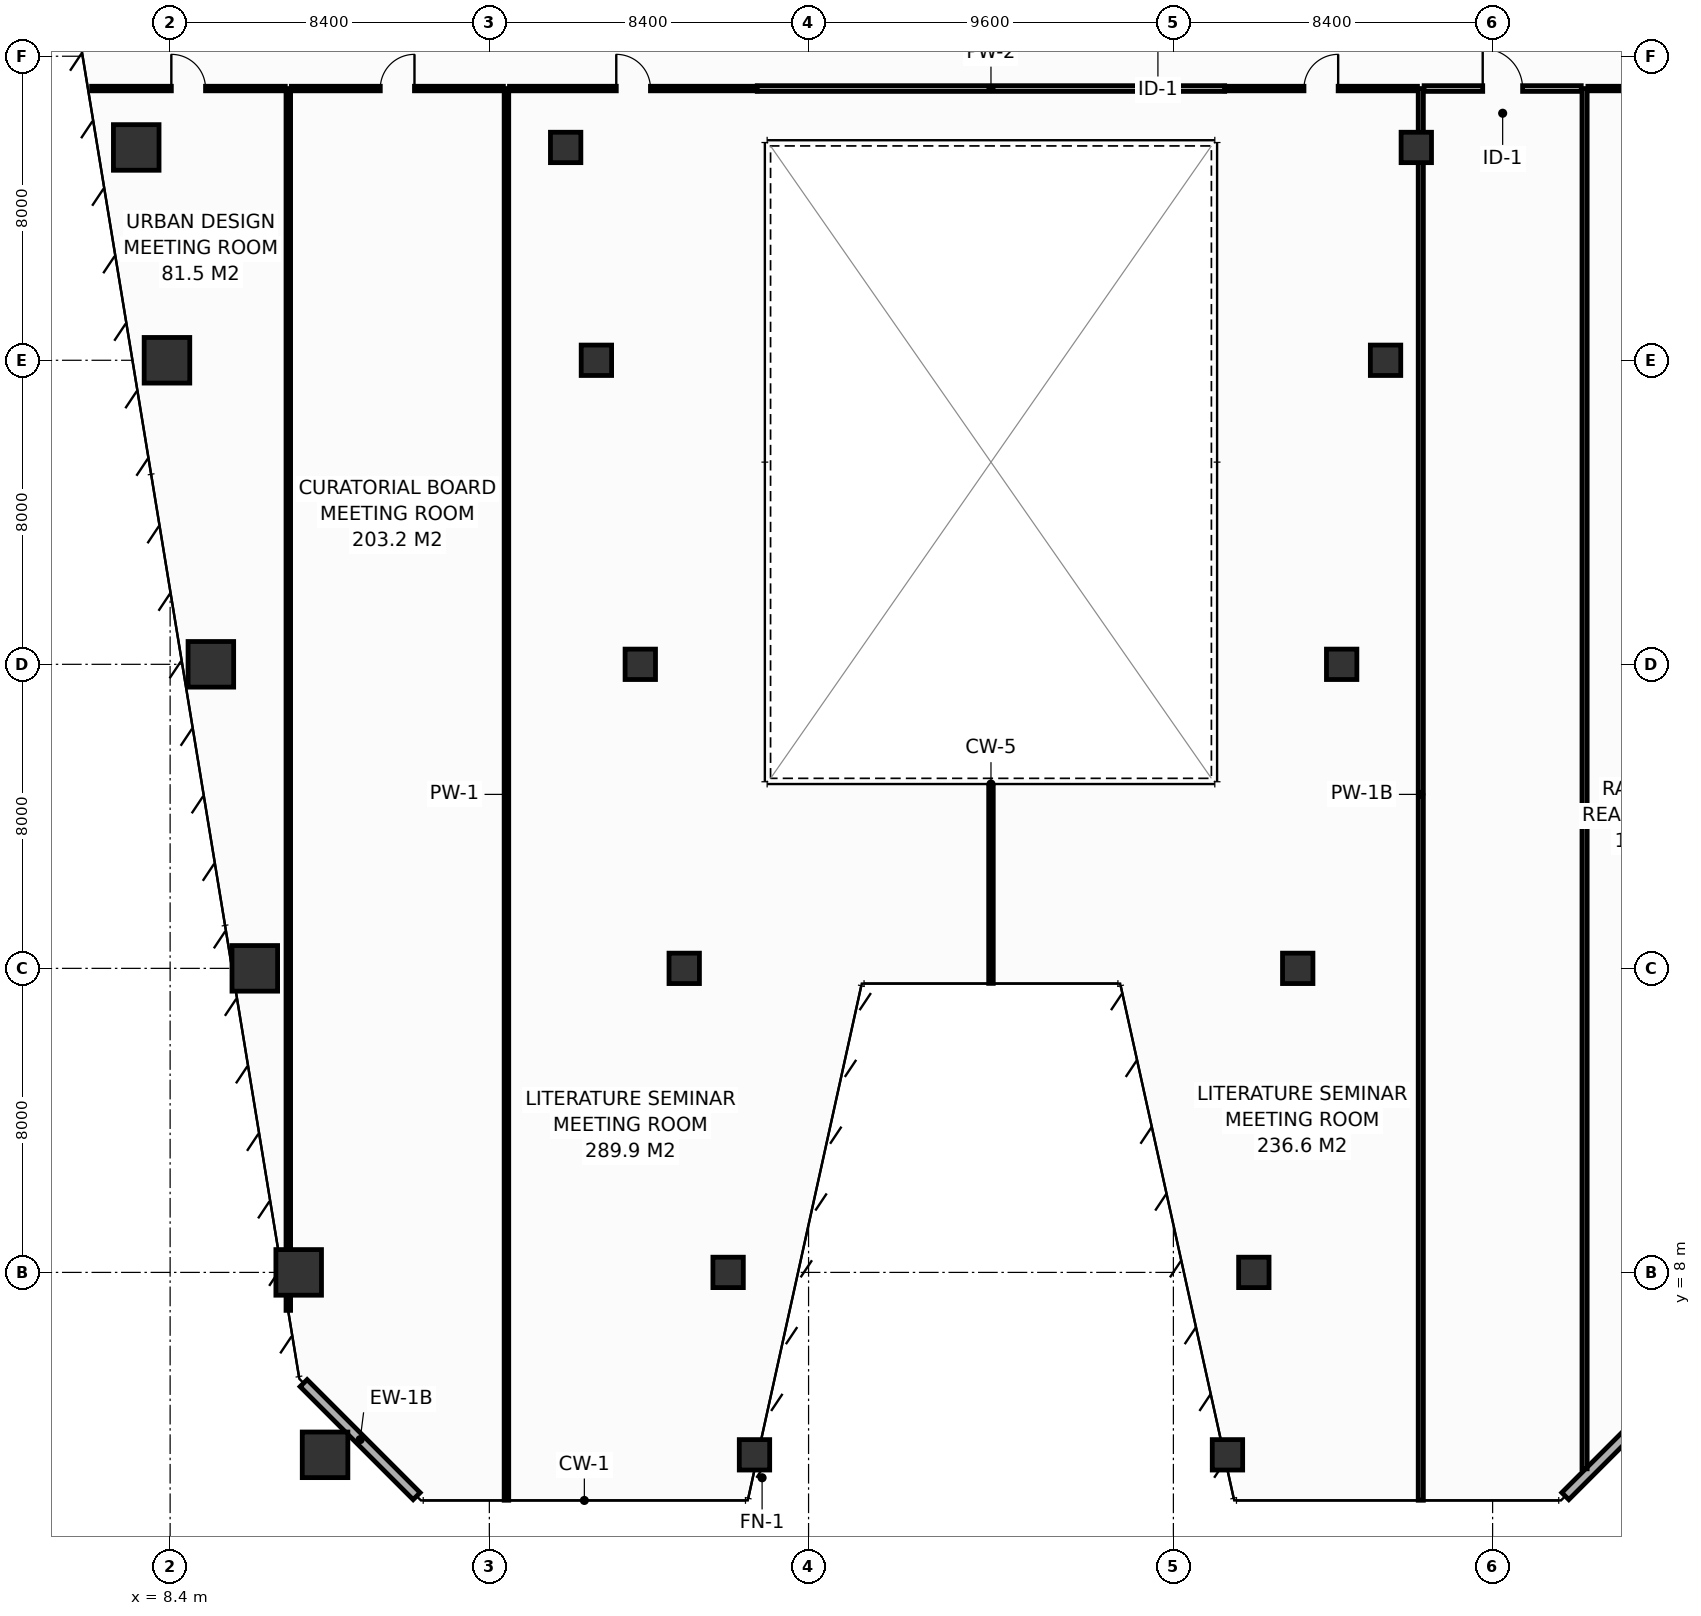
"""IFC4 building model, lengths in metres.
Left out: names, types, materials, properties, quantities, classifications, styles, units other than length and angle.
Written with IfcOpenShell. Run it as: python <this file> out.ifc"""

import sys

from ifc_helpers import new_model, si_unit, direction, frame, frame_2d, origin, origin_2d, place, context, subcontext, project, spatial, rectangle, hollow_rectangle, extrude, element, fill, save


model = new_model("IFC4")
c1 = context("Model", 3, precision=1e-05, world=origin(), true_north=direction((0.0, 1.0)))
c2 = subcontext(c1, "Body", "Model", "MODEL_VIEW")
j1 = project(units=[si_unit("LENGTHUNIT", "METRE"), si_unit("PLANEANGLEUNIT", "RADIAN")], contexts=[c1])
p1 = place(None, origin())
s1 = spatial("IfcSite", under=j1, at=p1, CompositionType="ELEMENT")
p2 = place(p1, origin())
s2 = spatial("IfcBuilding", under=s1, at=p2, CompositionType="ELEMENT")
p3 = place(p2, frame((0.0, 0.0, 92.8)))
s3 = spatial("IfcBuildingStorey", under=s2, at=p3, CompositionType="ELEMENT", Elevation=92.8)
p4 = place(p3, frame((12.477, 3.2, 0.0), z_axis=(0.0, 0.0, 1.0), x_axis=(1.0, 0.0, 0.0)))
e1 = element("IfcColumn", 1, at=p4, inside=s3, PredefinedType="COLUMN", context=c2, shape_type="SweptSolid", body=[
    extrude(hollow_rectangle(XDim=1.2, YDim=1.2, WallThickness=0.055, at=origin_2d()), origin(), (0.0, 0.0, 1.0), 4.4),
])
for number, where, z_axis, x_axis in (
    (2, (23.777, 3.2, 0.0), (0.0, 0.0, 1.0), (1.0, 0.0, 0.0)),
    (3, (36.223, 3.2, 0.0), (0.0, 0.0, 1.0), (1.0, 0.0, 0.0)),
):
    element("IfcColumn", number, at=place(p3, frame(where, z_axis=z_axis, x_axis=x_axis)), inside=s3, PredefinedType="COLUMN", context=c2, shape_type="SweptSolid", body=[
        extrude(hollow_rectangle(XDim=0.8, YDim=0.8, WallThickness=0.036, at=origin_2d()), origin(), (0.0, 0.0, 1.0), 4.4),
    ])
p5 = place(p3, frame((11.783, 8.0, 0.0), z_axis=(0.0, 0.0, 1.0), x_axis=(1.0, 0.0, 0.0)))
e4 = element("IfcColumn", 4, at=p5, inside=s3, PredefinedType="COLUMN", context=c2, shape_type="SweptSolid", body=[
    extrude(hollow_rectangle(XDim=1.2, YDim=1.2, WallThickness=0.055, at=origin_2d()), origin(), (0.0, 0.0, 1.0), 4.4),
])
for number, where, z_axis, x_axis in (
    (5, (23.083, 8.0, 0.0), (0.0, 0.0, 1.0), (1.0, 0.0, 0.0)),
    (6, (36.917, 8.0, 0.0), (0.0, 0.0, 1.0), (1.0, 0.0, 0.0)),
):
    element("IfcColumn", number, at=place(p3, frame(where, z_axis=z_axis, x_axis=x_axis)), inside=s3, PredefinedType="COLUMN", context=c2, shape_type="SweptSolid", body=[
        extrude(hollow_rectangle(XDim=0.8, YDim=0.8, WallThickness=0.036, at=origin_2d()), origin(), (0.0, 0.0, 1.0), 4.4),
    ])
p6 = place(p3, frame((10.628, 16.0, 0.0), z_axis=(0.0, 0.0, 1.0), x_axis=(1.0, 0.0, 0.0)))
e7 = element("IfcColumn", 7, at=p6, inside=s3, PredefinedType="COLUMN", context=c2, shape_type="SweptSolid", body=[
    extrude(hollow_rectangle(XDim=1.2, YDim=1.2, WallThickness=0.055, at=origin_2d()), origin(), (0.0, 0.0, 1.0), 4.4),
])
for number, where, z_axis, x_axis in (
    (8, (21.928, 16.0, 0.0), (0.0, 0.0, 1.0), (1.0, 0.0, 0.0)),
    (9, (38.072, 16.0, 0.0), (0.0, 0.0, 1.0), (1.0, 0.0, 0.0)),
):
    element("IfcColumn", number, at=place(p3, frame(where, z_axis=z_axis, x_axis=x_axis)), inside=s3, PredefinedType="COLUMN", context=c2, shape_type="SweptSolid", body=[
        extrude(hollow_rectangle(XDim=0.8, YDim=0.8, WallThickness=0.036, at=origin_2d()), origin(), (0.0, 0.0, 1.0), 4.4),
    ])
p7 = place(p3, frame((9.472, 24.0, 0.0), z_axis=(0.0, 0.0, 1.0), x_axis=(1.0, 0.0, 0.0)))
e10 = element("IfcColumn", 10, at=p7, inside=s3, PredefinedType="COLUMN", context=c2, shape_type="SweptSolid", body=[
    extrude(hollow_rectangle(XDim=1.2, YDim=1.2, WallThickness=0.055, at=origin_2d()), origin(), (0.0, 0.0, 1.0), 4.4),
])
for number, where, z_axis, x_axis in (
    (11, (20.772, 24.0, 0.0), (0.0, 0.0, 1.0), (1.0, 0.0, 0.0)),
    (12, (39.228, 24.0, 0.0), (0.0, 0.0, 1.0), (1.0, 0.0, 0.0)),
):
    element("IfcColumn", number, at=place(p3, frame(where, z_axis=z_axis, x_axis=x_axis)), inside=s3, PredefinedType="COLUMN", context=c2, shape_type="SweptSolid", body=[
        extrude(hollow_rectangle(XDim=0.8, YDim=0.8, WallThickness=0.036, at=origin_2d()), origin(), (0.0, 0.0, 1.0), 4.4),
    ])
p8 = place(p3, frame((8.317, 32.0, 0.0), z_axis=(0.0, 0.0, 1.0), x_axis=(1.0, 0.0, 0.0)))
e13 = element("IfcColumn", 13, at=p8, inside=s3, PredefinedType="COLUMN", context=c2, shape_type="SweptSolid", body=[
    extrude(hollow_rectangle(XDim=1.2, YDim=1.2, WallThickness=0.055, at=origin_2d()), origin(), (0.0, 0.0, 1.0), 4.4),
])
for number, where, z_axis, x_axis in (
    (14, (19.617, 32.0, 0.0), (0.0, 0.0, 1.0), (1.0, 0.0, 0.0)),
    (15, (40.383, 32.0, 0.0), (0.0, 0.0, 1.0), (1.0, 0.0, 0.0)),
):
    element("IfcColumn", number, at=place(p3, frame(where, z_axis=z_axis, x_axis=x_axis)), inside=s3, PredefinedType="COLUMN", context=c2, shape_type="SweptSolid", body=[
        extrude(hollow_rectangle(XDim=0.8, YDim=0.8, WallThickness=0.036, at=origin_2d()), origin(), (0.0, 0.0, 1.0), 4.4),
    ])
p9 = place(p3, frame((7.508, 37.6, 0.0), z_axis=(0.0, 0.0, 1.0), x_axis=(1.0, 0.0, 0.0)))
e16 = element("IfcColumn", 16, at=p9, inside=s3, PredefinedType="COLUMN", context=c2, shape_type="SweptSolid", body=[
    extrude(hollow_rectangle(XDim=1.2, YDim=1.2, WallThickness=0.055, at=origin_2d()), origin(), (0.0, 0.0, 1.0), 4.4),
])
for number, where, z_axis, x_axis in (
    (17, (18.808, 37.6, 0.0), (0.0, 0.0, 1.0), (1.0, 0.0, 0.0)),
    (18, (41.192, 37.6, 0.0), (0.0, 0.0, 1.0), (1.0, 0.0, 0.0)),
):
    element("IfcColumn", number, at=place(p3, frame(where, z_axis=z_axis, x_axis=x_axis)), inside=s3, PredefinedType="COLUMN", context=c2, shape_type="SweptSolid", body=[
        extrude(hollow_rectangle(XDim=0.8, YDim=0.8, WallThickness=0.036, at=origin_2d()), origin(), (0.0, 0.0, 1.0), 4.4),
    ])
for number, where, z_axis, x_axis in (
    (19, (11.913, 5.087, 0.0), (0.0, 0.0, 1.0), (0.707, -0.707, 0.0)),
    (20, (45.113, 2.113, 0.0), (0.0, 0.0, 1.0), (0.707, 0.707, 0.0)),
):
    element("IfcWall", number, at=place(p3, frame(where, z_axis=z_axis, x_axis=x_axis)), inside=s3, PredefinedType="STANDARD", context=c2, shape_type="SweptSolid", body=[
        extrude(rectangle(XDim=4.206, YDim=0.26, at=frame_2d((2.103, 0.0))), origin(), (0.0, 0.0, 1.0), 4.15),
    ])
p10 = place(p3, frame((11.51, 7.001, 0.0), z_axis=(0.0, 0.0, 1.0), x_axis=(0.0, 1.0, 0.0)))
e21 = element("IfcWall", 21, at=p10, inside=s3, PredefinedType="PARTITIONING", context=c2, shape_type="SweptSolid", body=[
    extrude(rectangle(XDim=32.149, YDim=0.12, at=frame_2d((16.075, 0.0))), origin(), (0.0, 0.0, 1.0), 3.335),
])
p11 = place(p3, frame((17.25, 2.005, 0.0), z_axis=(0.0, 0.0, 1.0), x_axis=(0.0, 1.0, 0.0)))
e22 = element("IfcWall", 22, at=p11, inside=s3, PredefinedType="PARTITIONING", context=c2, shape_type="SweptSolid", body=[
    extrude(rectangle(XDim=37.145, YDim=0.12, at=frame_2d((18.573, 0.0))), origin(), (0.0, 0.0, 1.0), 3.335),
])
p12 = place(p3, frame((41.31, 2.005, 0.0), z_axis=(0.0, 0.0, 1.0), x_axis=(0.0, 1.0, 0.0)))
e23 = element("IfcWall", 23, at=p12, inside=s3, PredefinedType="PARTITIONING", context=c2, shape_type="SweptSolid", body=[
    extrude(rectangle(XDim=37.145, YDim=0.135, at=frame_2d((18.573, 0.0))), origin(), (0.0, 0.0, 1.0), 3.335),
])
p13 = place(p3, frame((45.62, 2.832, 0.0), z_axis=(0.0, 0.0, 1.0), x_axis=(0.0, 1.0, 0.0)))
e24 = element("IfcWall", 24, at=p13, inside=s3, PredefinedType="PARTITIONING", context=c2, shape_type="SweptSolid", body=[
    extrude(rectangle(XDim=36.318, YDim=0.135, at=frame_2d((18.159, 0.0))), origin(), (0.0, 0.0, 1.0), 3.335),
])
p14 = place(p3, frame((30.0, 15.605, 0.0), z_axis=(0.0, 0.0, 1.0), x_axis=(0.0, 1.0, 0.0)))
e25 = element("IfcWall", 25, at=p14, inside=s3, PredefinedType="PARTITIONING", context=c2, shape_type="SweptSolid", body=[
    extrude(rectangle(XDim=5.175, YDim=0.12, at=frame_2d((2.587, 0.0))), origin(), (0.0, 0.0, 1.0), 4.15),
])
p15 = place(p3, frame((6.334, 39.15, 0.0), z_axis=(0.0, 0.0, 1.0), x_axis=(1.0, 0.0, 0.0)))
e26 = element("IfcWall", 26, at=p15, inside=s3, PredefinedType="PARTITIONING", context=c2, shape_type="SweptSolid", body=[
    extrude(rectangle(XDim=5.096, YDim=0.12, at=frame_2d((2.548, 0.0))), origin(), (0.0, 0.0, 1.0), 3.635),
])
p16 = place(p15, frame((2.098, 0.0, 0.0)))
e27 = element("IfcOpeningElement", 27, at=p16, cuts=e26, PredefinedType="OPENING", context=c2, shape_type="SweptSolid", body=[
    extrude(rectangle(XDim=0.9, YDim=2.1, at=frame_2d((0.45, 1.05))), frame((0.0, 0.07, 0.0), z_axis=(0.0, -1.0, 0.0), x_axis=(1.0, 0.0, 0.0)), (0.0, 0.0, 1.0), 0.14),
])
p17 = place(p3, frame((11.59, 39.15, 0.0), z_axis=(0.0, 0.0, 1.0), x_axis=(1.0, 0.0, 0.0)))
e28 = element("IfcWall", 28, at=p17, inside=s3, PredefinedType="PARTITIONING", context=c2, shape_type="SweptSolid", body=[
    extrude(rectangle(XDim=5.58, YDim=0.12, at=frame_2d((2.79, 0.0))), origin(), (0.0, 0.0, 1.0), 4.15),
])
p18 = place(p17, frame((2.34, 0.0, 0.0)))
e29 = element("IfcOpeningElement", 29, at=p18, cuts=e28, PredefinedType="OPENING", context=c2, shape_type="SweptSolid", body=[
    extrude(rectangle(XDim=0.9, YDim=2.1, at=frame_2d((0.45, 1.05))), frame((0.0, 0.07, 0.0), z_axis=(0.0, -1.0, 0.0), x_axis=(1.0, 0.0, 0.0)), (0.0, 0.0, 1.0), 0.14),
])
p19 = place(p3, frame((17.33, 39.15, 0.0), z_axis=(0.0, 0.0, 1.0), x_axis=(1.0, 0.0, 0.0)))
e30 = element("IfcWall", 30, at=p19, inside=s3, PredefinedType="PARTITIONING", context=c2, shape_type="SweptSolid", body=[
    extrude(rectangle(XDim=6.52, YDim=0.12, at=frame_2d((3.26, 0.0))), origin(), (0.0, 0.0, 1.0), 3.335),
])
p20 = place(p19, frame((2.81, 0.0, 0.0)))
e31 = element("IfcOpeningElement", 31, at=p20, cuts=e30, PredefinedType="OPENING", context=c2, shape_type="SweptSolid", body=[
    extrude(rectangle(XDim=0.9, YDim=2.1, at=frame_2d((0.45, 1.05))), frame((0.0, 0.07, 0.0), z_axis=(0.0, -1.0, 0.0), x_axis=(1.0, 0.0, 0.0)), (0.0, 0.0, 1.0), 0.14),
])
p21 = place(p3, frame((23.85, 39.15, 0.0), z_axis=(0.0, 0.0, 1.0), x_axis=(1.0, 0.0, 0.0)))
e32 = element("IfcWall", 32, at=p21, inside=s3, PredefinedType="PARTITIONING", context=c2, shape_type="SweptSolid", body=[
    extrude(rectangle(XDim=12.3, YDim=0.15, at=frame_2d((6.15, 0.0))), origin(), (0.0, 0.0, 1.0), 4.15),
])
p22 = place(p3, frame((36.15, 39.15, 0.0), z_axis=(0.0, 0.0, 1.0), x_axis=(1.0, 0.0, 0.0)))
e33 = element("IfcWall", 33, at=p22, inside=s3, PredefinedType="PARTITIONING", context=c2, shape_type="SweptSolid", body=[
    extrude(rectangle(XDim=5.073, YDim=0.12, at=frame_2d((2.536, 0.0))), origin(), (0.0, 0.0, 1.0), 3.335),
])
p23 = place(p22, frame((2.086, 0.0, 0.0)))
e34 = element("IfcOpeningElement", 34, at=p23, cuts=e33, PredefinedType="OPENING", context=c2, shape_type="SweptSolid", body=[
    extrude(rectangle(XDim=0.9, YDim=2.1, at=frame_2d((0.45, 1.05))), frame((0.0, 0.07, 0.0), z_axis=(0.0, -1.0, 0.0), x_axis=(1.0, 0.0, 0.0)), (0.0, 0.0, 1.0), 0.14),
])
p24 = place(p3, frame((41.397, 39.15, 0.0), z_axis=(0.0, 0.0, 1.0), x_axis=(1.0, 0.0, 0.0)))
e35 = element("IfcWall", 35, at=p24, inside=s3, PredefinedType="PARTITIONING", context=c2, shape_type="SweptSolid", body=[
    extrude(rectangle(XDim=4.135, YDim=0.15, at=frame_2d((2.067, 0.0))), origin(), (0.0, 0.0, 1.0), 4.15),
])
p25 = place(p24, frame((1.542, 0.0, 0.0)))
e36 = element("IfcOpeningElement", 36, at=p25, cuts=e35, PredefinedType="OPENING", context=c2, shape_type="SweptSolid", body=[
    extrude(rectangle(XDim=1.05, YDim=2.15, at=frame_2d((0.525, 1.075))), frame((0.0, 0.085, 0.0), z_axis=(0.0, -1.0, 0.0), x_axis=(1.0, 0.0, 0.0)), (0.0, 0.0, 1.0), 0.17),
])
p26 = place(p3, frame((45.708, 39.15, 0.0), z_axis=(0.0, 0.0, 1.0), x_axis=(1.0, 0.0, 0.0)))
e37 = element("IfcWall", 37, at=p26, inside=s3, PredefinedType="PARTITIONING", context=c2, shape_type="SweptSolid", body=[
    extrude(rectangle(XDim=3.785, YDim=0.12, at=frame_2d((1.893, 0.0))), origin(), (0.0, 0.0, 1.0), 4.15),
])
p27 = place(p26, frame((1.367, 0.0, 0.0)))
e38 = element("IfcOpeningElement", 38, at=p27, cuts=e37, PredefinedType="OPENING", context=c2, shape_type="SweptSolid", body=[
    extrude(rectangle(XDim=1.05, YDim=2.15, at=frame_2d((0.525, 1.075))), frame((0.0, 0.07, 0.0), z_axis=(0.0, -1.0, 0.0), x_axis=(1.0, 0.0, 0.0)), (0.0, 0.0, 1.0), 0.14),
])
p28 = place(p16, origin())
e39 = element("IfcDoor", 39, at=p28, inside=s3, OperationType="SINGLE_SWING_LEFT", PredefinedType="DOOR", context=c2, shape_type="SweptSolid", body=[
    extrude(rectangle(XDim=0.9, YDim=2.1, at=frame_2d((0.45, 1.05))), frame((0.0, 0.025, 0.0), z_axis=(0.0, -1.0, 0.0), x_axis=(1.0, 0.0, 0.0)), (0.0, 0.0, 1.0), 0.05),
])
fill(e27, e39)
p29 = place(p18, origin())
e40 = element("IfcDoor", 40, at=p29, inside=s3, OperationType="SINGLE_SWING_RIGHT", PredefinedType="DOOR", context=c2, shape_type="SweptSolid", body=[
    extrude(rectangle(XDim=0.9, YDim=2.1, at=frame_2d((0.45, 1.05))), frame((0.0, 0.025, 0.0), z_axis=(0.0, -1.0, 0.0), x_axis=(1.0, 0.0, 0.0)), (0.0, 0.0, 1.0), 0.05),
])
fill(e29, e40)
p30 = place(p20, origin())
e41 = element("IfcDoor", 41, at=p30, inside=s3, OperationType="SINGLE_SWING_LEFT", PredefinedType="DOOR", context=c2, shape_type="SweptSolid", body=[
    extrude(rectangle(XDim=0.9, YDim=2.1, at=frame_2d((0.45, 1.05))), frame((0.0, 0.025, 0.0), z_axis=(0.0, -1.0, 0.0), x_axis=(1.0, 0.0, 0.0)), (0.0, 0.0, 1.0), 0.05),
])
fill(e31, e41)
p31 = place(p23, origin())
e42 = element("IfcDoor", 42, at=p31, inside=s3, OperationType="SINGLE_SWING_RIGHT", PredefinedType="DOOR", context=c2, shape_type="SweptSolid", body=[
    extrude(rectangle(XDim=0.9, YDim=2.1, at=frame_2d((0.45, 1.05))), frame((0.0, 0.025, 0.0), z_axis=(0.0, -1.0, 0.0), x_axis=(1.0, 0.0, 0.0)), (0.0, 0.0, 1.0), 0.05),
])
fill(e34, e42)
p32 = place(p25, origin())
e43 = element("IfcDoor", 43, at=p32, inside=s3, OperationType="SINGLE_SWING_LEFT", PredefinedType="DOOR", context=c2, shape_type="SweptSolid", body=[
    extrude(rectangle(XDim=1.05, YDim=2.15, at=frame_2d((0.525, 1.075))), frame((0.0, 0.025, 0.0), z_axis=(0.0, -1.0, 0.0), x_axis=(1.0, 0.0, 0.0)), (0.0, 0.0, 1.0), 0.05),
])
fill(e36, e43)
save(model, sys.argv[1])
